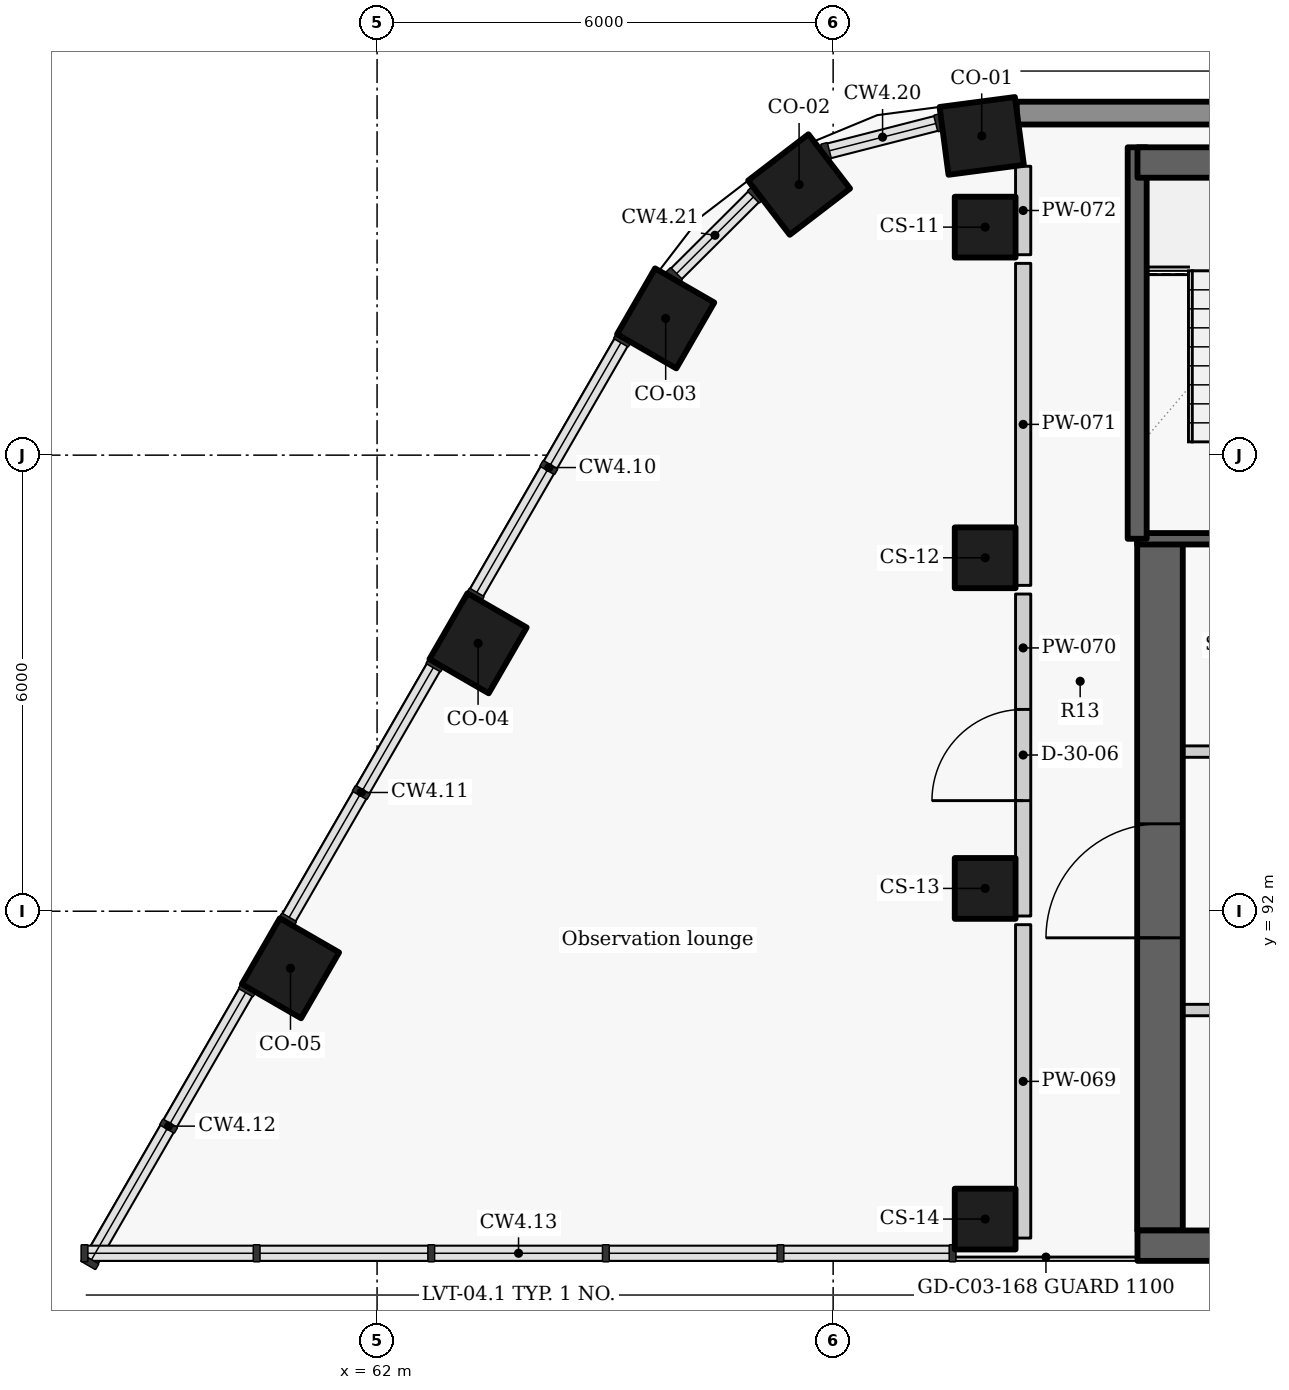
"""IFC4 building model, lengths in metres.
Left out: names, types, materials, properties, quantities, classifications, styles, units other than length and angle.
Written with IfcOpenShell. Run it as: python <this file> out.ifc"""

import sys

from ifc_helpers import new_model, si_unit, direction, frame, frame_2d, origin, origin_2d, place, context, subcontext, project, spatial, rectangle, extrude, element, fill, save


model = new_model("IFC4")
c1 = context("Model", 3, precision=1e-05, world=origin(), true_north=direction((0.0, 1.0)))
c2 = subcontext(c1, "Body", "Model", "MODEL_VIEW")
j1 = project(units=[si_unit("LENGTHUNIT", "METRE"), si_unit("PLANEANGLEUNIT", "RADIAN")], contexts=[c1])
p1 = place(None, origin())
s1 = spatial("IfcSite", under=j1, at=p1, CompositionType="ELEMENT")
p2 = place(p1, origin())
s2 = spatial("IfcBuilding", under=s1, at=p2, CompositionType="ELEMENT")
p3 = place(p2, frame((0.0, 0.0, 279.6)))
s3 = spatial("IfcBuildingStorey", under=s2, at=p3, CompositionType="ELEMENT", Elevation=279.6)
for number, where, z_axis, x_axis in (
    (1, (69.955, 102.2, 0.0), (0.0, 0.0, 1.0), (-0.991, -0.131, 0.0)),
    (2, (67.552, 101.56, 0.0), (0.0, 0.0, 1.0), (-0.793, -0.609, 0.0)),
    (3, (65.797, 99.8, 0.0), (0.0, 0.0, 1.0), (-0.5, -0.866, 0.0)),
    (4, (63.329, 95.525, 0.0), (0.0, 0.0, 1.0), (-0.5, -0.866, 0.0)),
    (5, (60.861, 91.25, 0.0), (0.0, 0.0, 1.0), (-0.5, -0.866, 0.0)),
):
    element("IfcColumn", number, at=place(p3, frame(where, z_axis=z_axis, x_axis=x_axis)), inside=s3, PredefinedType="COLUMN", context=c2, shape_type="SweptSolid", body=[
        extrude(rectangle(XDim=1.0, YDim=0.9, at=origin_2d()), origin(), (0.0, 0.0, 1.0), 3.6),
    ])
for number, where, z_axis, x_axis in (
    (6, (70.0, 101.0, 0.0), (0.0, 0.0, 1.0), (0.0, -1.0, 0.0)),
    (7, (70.0, 96.65, 0.0), (0.0, 0.0, 1.0), (0.0, -1.0, 0.0)),
    (8, (70.0, 92.3, 0.0), (0.0, 0.0, 1.0), (0.0, -1.0, 0.0)),
    (9, (70.0, 87.95, 0.0), (0.0, 0.0, 1.0), (0.0, -1.0, 0.0)),
):
    element("IfcColumn", number, at=place(p3, frame(where, z_axis=z_axis, x_axis=x_axis)), inside=s3, PredefinedType="COLUMN", context=c2, shape_type="SweptSolid", body=[
        extrude(rectangle(XDim=0.8, YDim=0.8, at=origin_2d()), origin(), (0.0, 0.0, 1.0), 3.6),
    ])
p4 = place(p3, frame((89.549, 102.5, 0.0), z_axis=(0.0, 0.0, 1.0), x_axis=(-1.0, 0.0, 0.0)))
e10 = element("IfcWall", 10, at=p4, inside=s3, PredefinedType="SOLIDWALL", context=c2, shape_type="SweptSolid", body=[
    extrude(rectangle(XDim=19.134, YDim=0.3, at=frame_2d((9.567, 0.0))), origin(), (0.0, 0.0, 1.0), 2.725),
])
p5 = place(p3, frame((85.4, 90.7, 0.0), z_axis=(0.0, 0.0, 1.0), x_axis=(-1.0, 0.0, 0.0)))
e11 = element("IfcWall", 11, at=p5, inside=s3, PredefinedType="PARTITIONING", context=c2, shape_type="SweptSolid", body=[
    extrude(rectangle(XDim=13.4, YDim=0.15, at=frame_2d((6.7, 0.0))), origin(), (0.0, 0.0, 1.0), 3.325),
])
p6 = place(p5, frame((11.325, 0.0, 0.0)))
e12 = element("IfcOpeningElement", 12, at=p6, cuts=e11, PredefinedType="OPENING", context=c2, shape_type="SweptSolid", body=[
    extrude(rectangle(XDim=0.9, YDim=2.1, at=frame_2d((0.45, 1.05))), frame((0.0, 0.085, 0.0), z_axis=(0.0, -1.0, 0.0), x_axis=(1.0, 0.0, 0.0)), (0.0, 0.0, 1.0), 0.17),
])
p7 = place(p5, frame((7.65, 0.0, 0.0)))
e13 = element("IfcOpeningElement", 13, at=p7, cuts=e11, PredefinedType="OPENING", context=c2, shape_type="SweptSolid", body=[
    extrude(rectangle(XDim=0.9, YDim=2.1, at=frame_2d((0.45, 1.05))), frame((0.0, 0.085, 0.0), z_axis=(0.0, -1.0, 0.0), x_axis=(1.0, 0.0, 0.0)), (0.0, 0.0, 1.0), 0.17),
])
p8 = place(p5, frame((3.6, 0.0, 0.0)))
e14 = element("IfcOpeningElement", 14, at=p8, cuts=e11, PredefinedType="OPENING", context=c2, shape_type="SweptSolid", body=[
    extrude(rectangle(XDim=0.9, YDim=2.1, at=frame_2d((0.45, 1.05))), frame((0.0, 0.085, 0.0), z_axis=(0.0, -1.0, 0.0), x_axis=(1.0, 0.0, 0.0)), (0.0, 0.0, 1.0), 0.17),
])
p9 = place(p5, frame((0.9, 0.0, 0.0)))
e15 = element("IfcOpeningElement", 15, at=p9, cuts=e11, PredefinedType="OPENING", context=c2, shape_type="SweptSolid", body=[
    extrude(rectangle(XDim=0.9, YDim=2.1, at=frame_2d((0.45, 1.05))), frame((0.0, 0.085, 0.0), z_axis=(0.0, -1.0, 0.0), x_axis=(1.0, 0.0, 0.0)), (0.0, 0.0, 1.0), 0.17),
])
p10 = place(p3, frame((72.3, 87.8, -0.275), z_axis=(0.0, 0.0, 1.0), x_axis=(0.0, 1.0, 0.0)))
e16 = element("IfcWall", 16, at=p10, inside=s3, PredefinedType="SHEAR", context=c2, shape_type="SweptSolid", body=[
    extrude(rectangle(XDim=9.1, YDim=0.6, at=frame_2d((4.55, 0.0))), origin(), (0.0, 0.0, 1.0), 3.6),
])
p11 = place(p10, frame((3.85, 0.0, 0.275)))
e17 = element("IfcOpeningElement", 17, at=p11, cuts=e16, PredefinedType="OPENING", context=c2, shape_type="SweptSolid", body=[
    extrude(rectangle(XDim=1.5, YDim=2.1, at=frame_2d((0.75, 1.05))), frame((0.0, 0.31, 0.0), z_axis=(0.0, -1.0, 0.0), x_axis=(1.0, 0.0, 0.0)), (0.0, 0.0, 1.0), 0.62),
])
p12 = place(p3, frame((72.0, 94.1, 0.0), z_axis=(0.0, 0.0, 1.0), x_axis=(1.0, 0.0, 0.0)))
e18 = element("IfcWall", 18, at=p12, inside=s3, PredefinedType="PARTITIONING", context=c2, shape_type="SweptSolid", body=[
    extrude(rectangle(XDim=10.703, YDim=0.15, at=frame_2d((5.352, 0.0))), origin(), (0.0, 0.0, 1.0), 3.325),
])
p13 = place(p12, frame((1.075, 0.0, 0.0)))
e19 = element("IfcOpeningElement", 19, at=p13, cuts=e18, PredefinedType="OPENING", context=c2, shape_type="SweptSolid", body=[
    extrude(rectangle(XDim=1.1, YDim=2.1, at=frame_2d((0.55, 1.05))), frame((0.0, 0.085, 0.0), z_axis=(0.0, -1.0, 0.0), x_axis=(1.0, 0.0, 0.0)), (0.0, 0.0, 1.0), 0.17),
])
p14 = place(p12, frame((3.5, 0.0, 0.0)))
e20 = element("IfcOpeningElement", 20, at=p14, cuts=e18, PredefinedType="OPENING", context=c2, shape_type="SweptSolid", body=[
    extrude(rectangle(XDim=0.9, YDim=2.1, at=frame_2d((0.45, 1.05))), frame((0.0, 0.085, 0.0), z_axis=(0.0, -1.0, 0.0), x_axis=(1.0, 0.0, 0.0)), (0.0, 0.0, 1.0), 0.17),
])
p15 = place(p12, frame((6.05, 0.0, 0.0)))
e21 = element("IfcOpeningElement", 21, at=p15, cuts=e18, PredefinedType="OPENING", context=c2, shape_type="SweptSolid", body=[
    extrude(rectangle(XDim=1.2, YDim=2.1, at=frame_2d((0.6, 1.05))), frame((0.0, 0.085, 0.0), z_axis=(0.0, -1.0, 0.0), x_axis=(1.0, 0.0, 0.0)), (0.0, 0.0, 1.0), 0.17),
])
p16 = place(p12, frame((8.9, 0.0, 0.0)))
e22 = element("IfcOpeningElement", 22, at=p16, cuts=e18, PredefinedType="OPENING", context=c2, shape_type="SweptSolid", body=[
    extrude(rectangle(XDim=0.9, YDim=2.1, at=frame_2d((0.45, 1.05))), frame((0.0, 0.085, 0.0), z_axis=(0.0, -1.0, 0.0), x_axis=(1.0, 0.0, 0.0)), (0.0, 0.0, 1.0), 0.17),
])
p17 = place(p3, frame((74.6, 96.9, -0.275), z_axis=(0.0, 0.0, 1.0), x_axis=(-1.0, 0.0, 0.0)))
e23 = element("IfcWall", 23, at=p17, inside=s3, PredefinedType="SHEAR", context=c2, shape_type="SweptSolid", body=[
    extrude(rectangle(XDim=2.6, YDim=0.15, at=frame_2d((1.3, 0.0))), origin(), (0.0, 0.0, 1.0), 3.6),
])
p18 = place(p17, frame((0.37, 0.0, 0.275)))
e24 = element("IfcOpeningElement", 24, at=p18, cuts=e23, PredefinedType="OPENING", context=c2, shape_type="SweptSolid", body=[
    extrude(rectangle(XDim=1.1, YDim=2.1, at=frame_2d((0.55, 1.05))), frame((0.0, 0.085, 0.0), z_axis=(0.0, -1.0, 0.0), x_axis=(1.0, 0.0, 0.0)), (0.0, 0.0, 1.0), 0.17),
])
p19 = place(p3, frame((72.0, 96.9, -0.275), z_axis=(0.0, 0.0, 1.0), x_axis=(0.0, 1.0, 0.0)))
e25 = element("IfcWall", 25, at=p19, inside=s3, PredefinedType="SHEAR", context=c2, shape_type="SweptSolid", body=[
    extrude(rectangle(XDim=5.15, YDim=0.25, at=frame_2d((2.575, 0.0))), origin(), (0.0, 0.0, 1.0), 3.6),
])
p20 = place(p3, frame((70.5, 87.7, 0.0), z_axis=(0.0, 0.0, 1.0), x_axis=(0.0, 1.0, 0.0)))
e26 = element("IfcWall", 26, at=p20, inside=s3, PredefinedType="PARTITIONING", context=c2, shape_type="SweptSolid", body=[
    extrude(rectangle(XDim=4.123, YDim=0.2, at=frame_2d((2.062, 0.0))), origin(), (0.0, 0.0, 1.0), 3.325),
])
p21 = place(p3, frame((70.5, 91.937, 0.0), z_axis=(0.0, 0.0, 1.0), x_axis=(0.0, 1.0, 0.0)))
e27 = element("IfcWall", 27, at=p21, inside=s3, PredefinedType="PARTITIONING", context=c2, shape_type="SweptSolid", body=[
    extrude(rectangle(XDim=4.236, YDim=0.2, at=frame_2d((2.118, 0.0))), origin(), (0.0, 0.0, 1.0), 3.325),
])
p22 = place(p21, frame((1.518, 0.0, 0.0)))
e28 = element("IfcOpeningElement", 28, at=p22, cuts=e27, PredefinedType="OPENING", context=c2, shape_type="SweptSolid", body=[
    extrude(rectangle(XDim=1.2, YDim=2.1, at=frame_2d((0.6, 1.05))), frame((0.0, 0.11, 0.0), z_axis=(0.0, -1.0, 0.0), x_axis=(1.0, 0.0, 0.0)), (0.0, 0.0, 1.0), 0.22),
])
p23 = place(p3, frame((70.5, 96.287, 0.0), z_axis=(0.0, 0.0, 1.0), x_axis=(0.0, 1.0, 0.0)))
e29 = element("IfcWall", 29, at=p23, inside=s3, PredefinedType="PARTITIONING", context=c2, shape_type="SweptSolid", body=[
    extrude(rectangle(XDim=4.236, YDim=0.2, at=frame_2d((2.118, 0.0))), origin(), (0.0, 0.0, 1.0), 3.325),
])
p24 = place(p3, frame((70.5, 100.637, 0.0), z_axis=(0.0, 0.0, 1.0), x_axis=(0.0, 1.0, 0.0)))
e30 = element("IfcWall", 30, at=p24, inside=s3, PredefinedType="PARTITIONING", context=c2, shape_type="SweptSolid", body=[
    extrude(rectangle(XDim=1.164, YDim=0.2, at=frame_2d((0.582, 0.0))), origin(), (0.0, 0.0, 1.0), 3.325),
])
p25 = place(p3, frame((72.004, 87.6, -0.275), z_axis=(0.0, 0.0, 1.0), x_axis=(1.0, 0.0, 0.0)))
e31 = element("IfcWall", 31, at=p25, inside=s3, PredefinedType="SHEAR", context=c2, shape_type="SweptSolid", body=[
    extrude(rectangle(XDim=13.396, YDim=0.4, at=frame_2d((6.698, 0.0))), origin(), (0.0, 0.0, 1.0), 3.6),
])
p26 = place(p3, frame((72.004, 101.85, -0.275), z_axis=(0.0, 0.0, 1.0), x_axis=(1.0, 0.0, 0.0)))
e32 = element("IfcWall", 32, at=p26, inside=s3, PredefinedType="SHEAR", context=c2, shape_type="SweptSolid", body=[
    extrude(rectangle(XDim=15.992, YDim=0.4, at=frame_2d((7.996, 0.0))), origin(), (0.0, 0.0, 1.0), 3.6),
])
p27 = place(p22, origin())
e33 = element("IfcDoor", 33, at=p27, inside=s3, OperationType="SINGLE_SWING_LEFT", PredefinedType="DOOR", context=c2, shape_type="SweptSolid", body=[
    extrude(rectangle(XDim=1.2, YDim=2.1, at=frame_2d((0.6, 1.05))), frame((0.0, 0.025, 0.0), z_axis=(0.0, -1.0, 0.0), x_axis=(1.0, 0.0, 0.0)), (0.0, 0.0, 1.0), 0.05),
])
fill(e28, e33)
p28 = place(p11, origin())
e34 = element("IfcDoor", 34, at=p28, inside=s3, OperationType="DOUBLE_DOOR_SINGLE_SWING", PredefinedType="DOOR", context=c2, shape_type="SweptSolid", body=[
    extrude(rectangle(XDim=1.5, YDim=2.1, at=frame_2d((0.75, 1.05))), frame((0.0, 0.025, 0.0), z_axis=(0.0, -1.0, 0.0), x_axis=(1.0, 0.0, 0.0)), (0.0, 0.0, 1.0), 0.05),
])
fill(e17, e34)
save(model, sys.argv[1])
